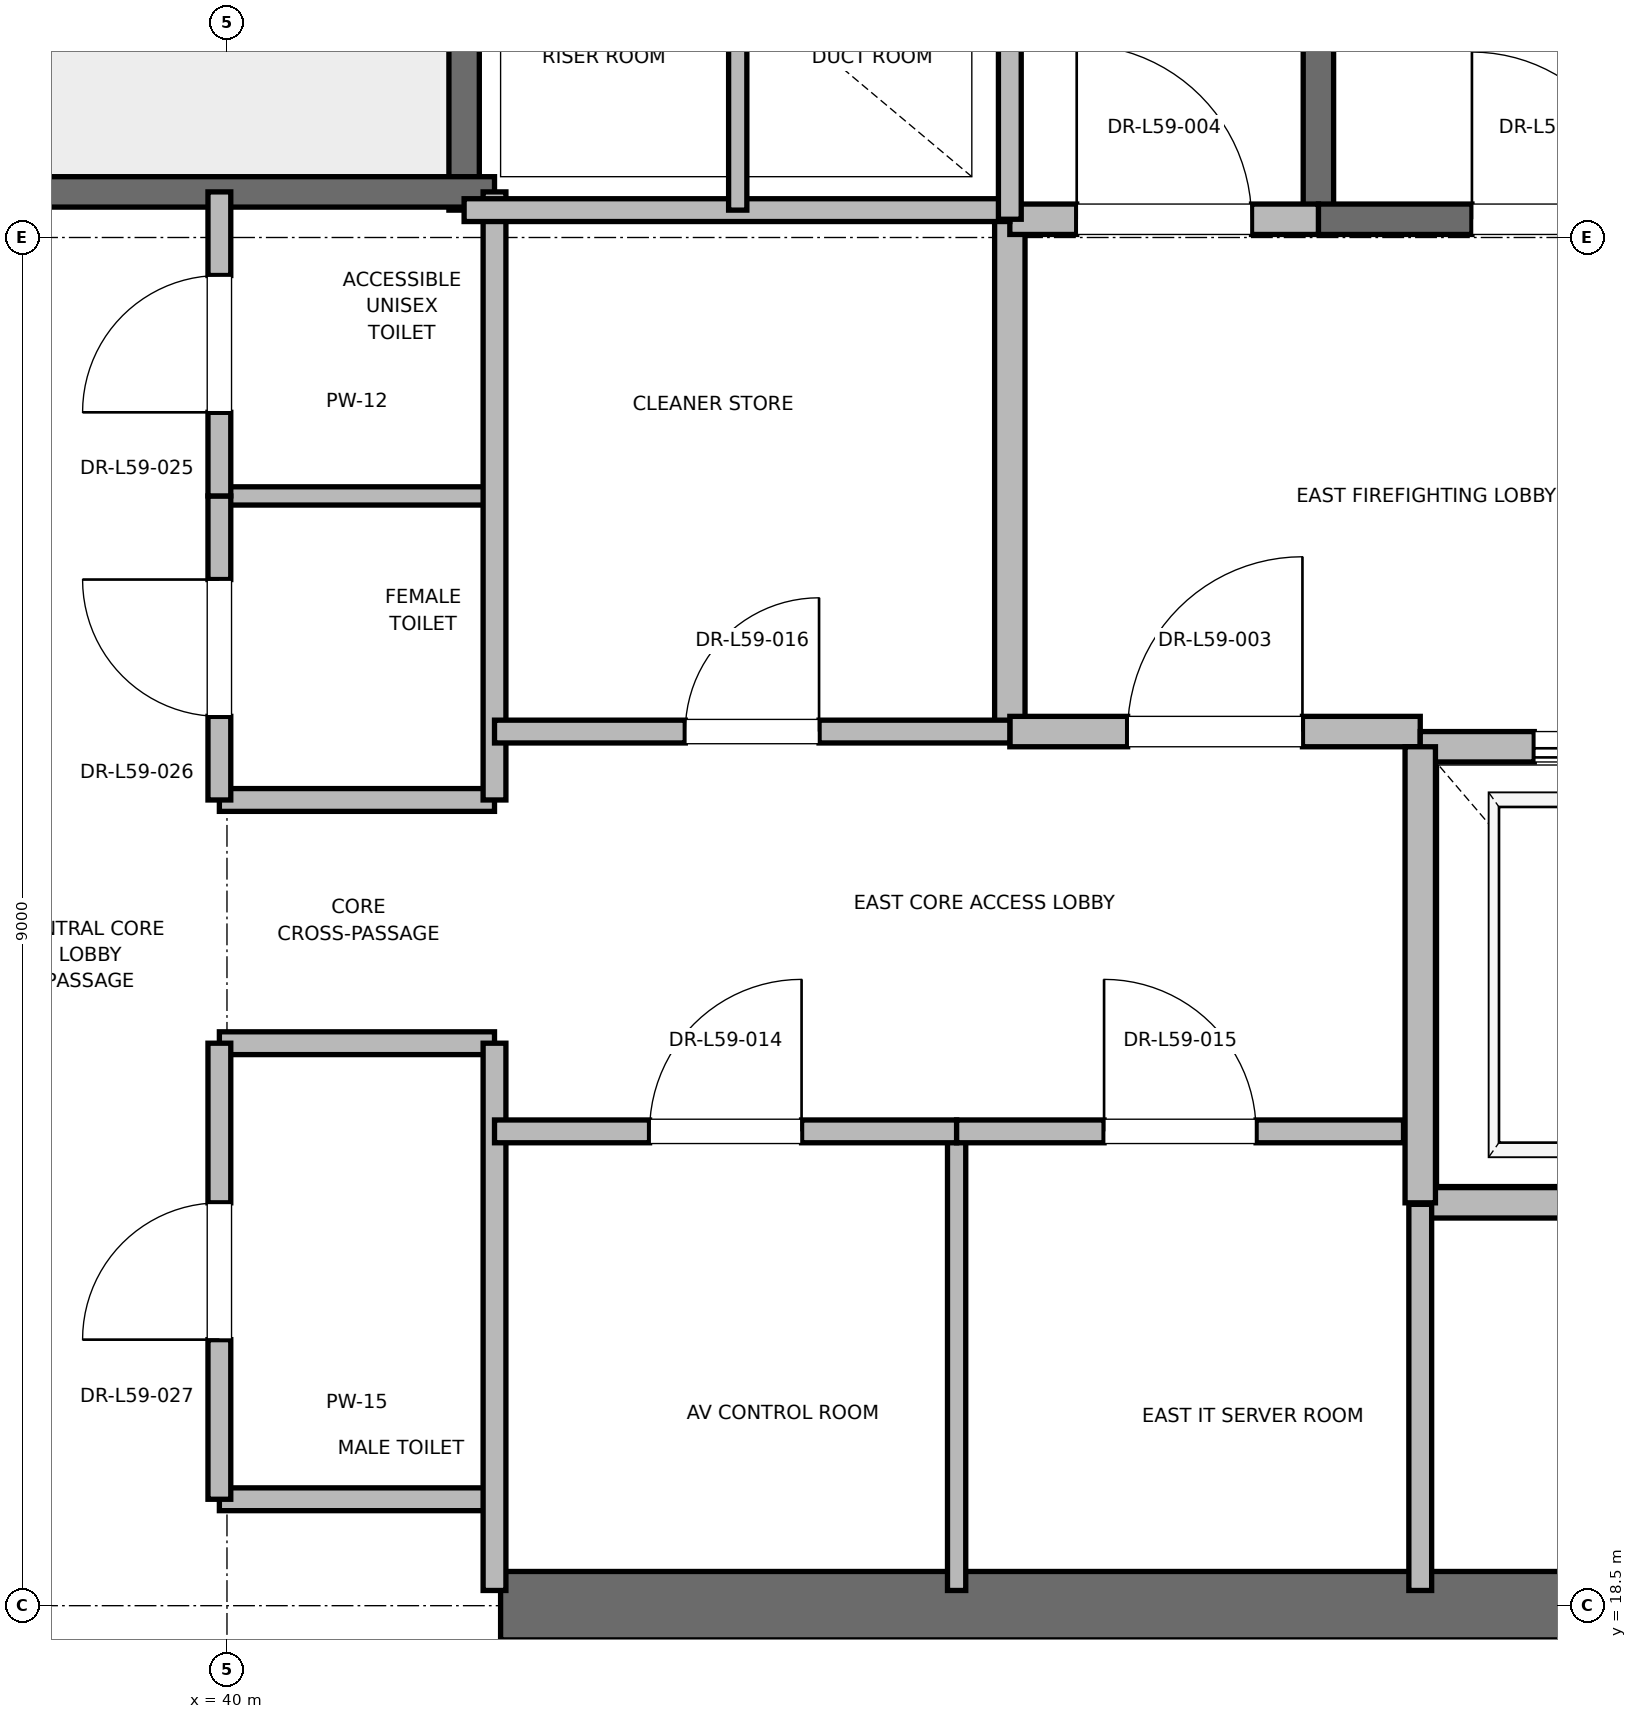
"""IFC4 building model, lengths in metres.
Left out: names, types, materials, properties, quantities, classifications, styles, units other than length and angle.
Written with IfcOpenShell. Run it as: python <this file> out.ifc"""

import sys

from ifc_helpers import new_model, si_unit, direction, frame, frame_2d, origin, place, context, subcontext, project, spatial, rectangle, extrude, element, fill, save


model = new_model("IFC4")
c1 = context("Model", 3, precision=1e-05, world=origin(), true_north=direction((0.0, 1.0)))
c2 = subcontext(c1, "Body", "Model", "MODEL_VIEW")
j1 = project(units=[si_unit("LENGTHUNIT", "METRE"), si_unit("PLANEANGLEUNIT", "RADIAN")], contexts=[c1])
p1 = place(None, origin())
s1 = spatial("IfcSite", under=j1, at=p1, CompositionType="ELEMENT")
p2 = place(p1, origin())
s2 = spatial("IfcBuilding", under=s1, at=p2, CompositionType="ELEMENT")
p3 = place(p2, frame((0.0, 0.0, 255.2)))
s3 = spatial("IfcBuildingStorey", under=s2, at=p3, CompositionType="ELEMENT", Elevation=255.2)
p4 = place(p3, frame((41.8, 18.5, 0.0), z_axis=(0.0, 0.0, 1.0), x_axis=(1.0, 0.0, 0.0)))
e1 = element("IfcWall", 1, at=p4, inside=s3, PredefinedType="SHEAR", context=c2, shape_type="SweptSolid", body=[
    extrude(rectangle(XDim=9.2, YDim=0.45, at=frame_2d((4.6, 0.0))), origin(), (0.0, 0.0, 1.0), 3.785),
])
p5 = place(p3, frame((47.18, 27.62, 0.0), z_axis=(0.0, 0.0, 1.0), x_axis=(0.0, 1.0, 0.0)))
e2 = element("IfcWall", 2, at=p5, inside=s3, PredefinedType="SOLIDWALL", context=c2, shape_type="SweptSolid", body=[
    extrude(rectangle(XDim=8.18, YDim=0.2, at=frame_2d((4.09, 0.0))), origin(), (0.0, 0.0, 1.0), 3.785),
])
p6 = place(p3, frame((47.18, 27.62, 0.0), z_axis=(0.0, 0.0, 1.0), x_axis=(1.0, 0.0, 0.0)))
e3 = element("IfcWall", 3, at=p6, inside=s3, PredefinedType="SOLIDWALL", context=c2, shape_type="SweptSolid", body=[
    extrude(rectangle(XDim=3.12, YDim=0.2, at=frame_2d((1.56, 0.0))), origin(), (0.0, 0.0, 1.0), 3.785),
])
p7 = place(p6, frame((1.01, 0.0, 0.0)))
e4 = element("IfcOpeningElement", 4, at=p7, cuts=e3, PredefinedType="OPENING", context=c2, shape_type="SweptSolid", body=[
    extrude(rectangle(XDim=1.1, YDim=2.15, at=frame_2d((0.55, 1.075))), frame((0.0, 0.1, 0.0), z_axis=(0.0, -1.0, 0.0), x_axis=(1.0, 0.0, 0.0)), (0.0, 0.0, 1.0), 0.2),
])
p8 = place(p3, frame((41.56, 27.68, 0.0), z_axis=(0.0, 0.0, 1.0), x_axis=(0.0, 1.0, 0.0)))
e5 = element("IfcWall", 5, at=p8, inside=s3, PredefinedType="SOLIDWALL", context=c2, shape_type="SweptSolid", body=[
    extrude(rectangle(XDim=8.57, YDim=0.2, at=frame_2d((4.285, 0.0))), origin(), (0.0, 0.0, 1.0), 3.785),
])
p9 = place(p3, frame((38.44, 27.8, 0.0), z_axis=(0.0, 0.0, 1.0), x_axis=(1.0, 0.0, 0.0)))
e6 = element("IfcWall", 6, at=p9, inside=s3, PredefinedType="SOLIDWALL", context=c2, shape_type="SweptSolid", body=[
    extrude(rectangle(XDim=3.32, YDim=0.2, at=frame_2d((1.66, 0.0))), origin(), (0.0, 0.0, 1.0), 3.785),
])
p10 = place(p3, frame((45.15, 24.25, 0.0), z_axis=(0.0, 0.0, 1.0), x_axis=(0.0, 1.0, 0.0)))
e7 = element("IfcWall", 7, at=p10, inside=s3, PredefinedType="PARTITIONING", context=c2, shape_type="SweptSolid", body=[
    extrude(rectangle(XDim=3.37, YDim=0.2, at=frame_2d((1.685, 0.0))), origin(), (0.0, 0.0, 1.0), 3.785),
])
p11 = place(p3, frame((45.15, 24.25, 0.0), z_axis=(0.0, 0.0, 1.0), x_axis=(1.0, 0.0, 0.0)))
e8 = element("IfcWall", 8, at=p11, inside=s3, PredefinedType="PARTITIONING", context=c2, shape_type="SweptSolid", body=[
    extrude(rectangle(XDim=2.7, YDim=0.2, at=frame_2d((1.35, 0.0))), origin(), (0.0, 0.0, 1.0), 3.785),
])
p12 = place(p11, frame((0.775, 0.0, 0.0)))
e9 = element("IfcOpeningElement", 9, at=p12, cuts=e8, PredefinedType="OPENING", context=c2, shape_type="SweptSolid", body=[
    extrude(rectangle(XDim=1.15, YDim=2.2, at=frame_2d((0.575, 1.1))), frame((0.0, 0.1, 0.0), z_axis=(0.0, -1.0, 0.0), x_axis=(1.0, 0.0, 0.0)), (0.0, 0.0, 1.0), 0.2),
])
p13 = place(p3, frame((45.15, 27.62, 0.0), z_axis=(0.0, 0.0, 1.0), x_axis=(1.0, 0.0, 0.0)))
e10 = element("IfcWall", 10, at=p13, inside=s3, PredefinedType="PARTITIONING", context=c2, shape_type="SweptSolid", body=[
    extrude(rectangle(XDim=2.03, YDim=0.2, at=frame_2d((1.015, 0.0))), origin(), (0.0, 0.0, 1.0), 3.785),
])
p14 = place(p13, frame((0.44, 0.0, 0.0)))
e11 = element("IfcOpeningElement", 11, at=p14, cuts=e10, PredefinedType="OPENING", context=c2, shape_type="SweptSolid", body=[
    extrude(rectangle(XDim=1.15, YDim=2.2, at=frame_2d((0.575, 1.1))), frame((0.0, 0.1, 0.0), z_axis=(0.0, -1.0, 0.0), x_axis=(1.0, 0.0, 0.0)), (0.0, 0.0, 1.0), 0.2),
])
p15 = place(p3, frame((47.85, 21.15, 0.0), z_axis=(0.0, 0.0, 1.0), x_axis=(1.0, 0.0, 0.0)))
e12 = element("IfcWall", 12, at=p15, inside=s3, PredefinedType="SOLIDWALL", context=c2, shape_type="SweptSolid", body=[
    extrude(rectangle(XDim=2.6, YDim=0.2, at=frame_2d((1.3, 0.0))), origin(), (0.0, 0.0, 1.0), 3.785),
])
p16 = place(p3, frame((50.45, 24.15, 0.0), z_axis=(0.0, 0.0, 1.0), x_axis=(-1.0, 0.0, 0.0)))
e13 = element("IfcWall", 13, at=p16, inside=s3, PredefinedType="SOLIDWALL", context=c2, shape_type="SweptSolid", body=[
    extrude(rectangle(XDim=2.6, YDim=0.2, at=frame_2d((1.3, 0.0))), origin(), (0.0, 0.0, 1.0), 2.865),
])
p17 = place(p16, frame((0.75, 0.0, 0.0)))
e14 = element("IfcOpeningElement", 14, at=p17, cuts=e13, PredefinedType="OPENING", context=c2, shape_type="SweptSolid", body=[
    extrude(rectangle(XDim=1.1, YDim=2.2, at=frame_2d((0.55, 1.1))), frame((0.0, 0.1, 0.0), z_axis=(0.0, -1.0, 0.0), x_axis=(1.0, 0.0, 0.0)), (0.0, 0.0, 1.0), 0.2),
])
p18 = place(p3, frame((47.85, 24.15, 0.0), z_axis=(0.0, 0.0, 1.0), x_axis=(0.0, -1.0, 0.0)))
e15 = element("IfcWall", 15, at=p18, inside=s3, PredefinedType="SOLIDWALL", context=c2, shape_type="SweptSolid", body=[
    extrude(rectangle(XDim=3.0, YDim=0.2, at=frame_2d((1.5, 0.0))), origin(), (0.0, 0.0, 1.0), 3.785),
])
for number, where, z_axis, x_axis in (
    (16, (39.95, 19.2, 0.0), (0.0, 0.0, 1.0), (1.0, 0.0, 0.0)),
    (17, (39.95, 22.2, 0.0), (0.0, 0.0, 1.0), (1.0, 0.0, 0.0)),
    (18, (39.95, 23.8, 0.0), (0.0, 0.0, 1.0), (1.0, 0.0, 0.0)),
):
    element("IfcWall", number, at=place(p3, frame(where, z_axis=z_axis, x_axis=x_axis)), inside=s3, PredefinedType="PARTITIONING", context=c2, shape_type="SweptSolid", body=[
        extrude(rectangle(XDim=1.81, YDim=0.15, at=frame_2d((0.905, 0.0))), origin(), (0.0, 0.0, 1.0), 2.85),
    ])
p19 = place(p3, frame((39.95, 25.8, 0.0), z_axis=(0.0, 0.0, 1.0), x_axis=(1.0, 0.0, 0.0)))
e19 = element("IfcWall", 19, at=p19, inside=s3, PredefinedType="PARTITIONING", context=c2, shape_type="SweptSolid", body=[
    extrude(rectangle(XDim=1.81, YDim=0.12, at=frame_2d((0.905, 0.0))), origin(), (0.0, 0.0, 1.0), 2.85),
])
p20 = place(p3, frame((41.76, 18.6, 0.0), z_axis=(0.0, 0.0, 1.0), x_axis=(0.0, 1.0, 0.0)))
e20 = element("IfcWall", 20, at=p20, inside=s3, PredefinedType="PARTITIONING", context=c2, shape_type="SweptSolid", body=[
    extrude(rectangle(XDim=3.6, YDim=0.15, at=frame_2d((1.8, 0.0))), origin(), (0.0, 0.0, 1.0), 2.85),
])
p21 = place(p3, frame((41.76, 23.8, 0.0), z_axis=(0.0, 0.0, 1.0), x_axis=(0.0, 1.0, 0.0)))
e21 = element("IfcWall", 21, at=p21, inside=s3, PredefinedType="PARTITIONING", context=c2, shape_type="SweptSolid", body=[
    extrude(rectangle(XDim=4.0, YDim=0.15, at=frame_2d((2.0, 0.0))), origin(), (0.0, 0.0, 1.0), 2.85),
])
p22 = place(p3, frame((39.95, 19.2, 0.0), z_axis=(0.0, 0.0, 1.0), x_axis=(0.0, 1.0, 0.0)))
e22 = element("IfcWall", 22, at=p22, inside=s3, PredefinedType="PARTITIONING", context=c2, shape_type="SweptSolid", body=[
    extrude(rectangle(XDim=3.0, YDim=0.15, at=frame_2d((1.5, 0.0))), origin(), (0.0, 0.0, 1.0), 2.85),
])
p23 = place(p22, frame((1.05, 0.0, 0.0)))
e23 = element("IfcOpeningElement", 23, at=p23, cuts=e22, PredefinedType="OPENING", context=c2, shape_type="SweptSolid", body=[
    extrude(rectangle(XDim=0.9, YDim=2.1, at=frame_2d((0.45, 1.05))), frame((0.0, 0.075, 0.0), z_axis=(0.0, -1.0, 0.0), x_axis=(1.0, 0.0, 0.0)), (0.0, 0.0, 1.0), 0.15),
])
p24 = place(p3, frame((39.95, 23.8, 0.0), z_axis=(0.0, 0.0, 1.0), x_axis=(0.0, 1.0, 0.0)))
e24 = element("IfcWall", 24, at=p24, inside=s3, PredefinedType="PARTITIONING", context=c2, shape_type="SweptSolid", body=[
    extrude(rectangle(XDim=2.0, YDim=0.15, at=frame_2d((1.0, 0.0))), origin(), (0.0, 0.0, 1.0), 2.85),
])
p25 = place(p24, frame((0.55, 0.0, 0.0)))
e25 = element("IfcOpeningElement", 25, at=p25, cuts=e24, PredefinedType="OPENING", context=c2, shape_type="SweptSolid", body=[
    extrude(rectangle(XDim=0.9, YDim=2.1, at=frame_2d((0.45, 1.05))), frame((0.0, 0.075, 0.0), z_axis=(0.0, -1.0, 0.0), x_axis=(1.0, 0.0, 0.0)), (0.0, 0.0, 1.0), 0.15),
])
p26 = place(p3, frame((39.95, 25.8, 0.0), z_axis=(0.0, 0.0, 1.0), x_axis=(0.0, 1.0, 0.0)))
e26 = element("IfcWall", 26, at=p26, inside=s3, PredefinedType="PARTITIONING", context=c2, shape_type="SweptSolid", body=[
    extrude(rectangle(XDim=2.0, YDim=0.15, at=frame_2d((1.0, 0.0))), origin(), (0.0, 0.0, 1.0), 2.85),
])
p27 = place(p26, frame((0.55, 0.0, 0.0)))
e27 = element("IfcOpeningElement", 27, at=p27, cuts=e26, PredefinedType="OPENING", context=c2, shape_type="SweptSolid", body=[
    extrude(rectangle(XDim=0.9, YDim=2.1, at=frame_2d((0.45, 1.05))), frame((0.0, 0.075, 0.0), z_axis=(0.0, -1.0, 0.0), x_axis=(1.0, 0.0, 0.0)), (0.0, 0.0, 1.0), 0.15),
])
p28 = place(p3, frame((41.56, 27.68, 0.0), z_axis=(0.0, 0.0, 1.0), x_axis=(1.0, 0.0, 0.0)))
e28 = element("IfcWall", 28, at=p28, inside=s3, PredefinedType="PARTITIONING", context=c2, shape_type="SweptSolid", body=[
    extrude(rectangle(XDim=3.59, YDim=0.15, at=frame_2d((1.795, 0.0))), origin(), (0.0, 0.0, 1.0), 2.85),
])
p29 = place(p3, frame((47.85, 18.6, 0.0), z_axis=(0.0, 0.0, 1.0), x_axis=(0.0, 1.0, 0.0)))
e29 = element("IfcWall", 29, at=p29, inside=s3, PredefinedType="PARTITIONING", context=c2, shape_type="SweptSolid", body=[
    extrude(rectangle(XDim=2.54, YDim=0.15, at=frame_2d((1.27, 0.0))), origin(), (0.0, 0.0, 1.0), 2.85),
])
p30 = place(p3, frame((44.8, 18.6, 0.0), z_axis=(0.0, 0.0, 1.0), x_axis=(0.0, 1.0, 0.0)))
e30 = element("IfcWall", 30, at=p30, inside=s3, PredefinedType="PARTITIONING", context=c2, shape_type="SweptSolid", body=[
    extrude(rectangle(XDim=3.02, YDim=0.12, at=frame_2d((1.51, 0.0))), origin(), (0.0, 0.0, 1.0), 2.85),
])
p31 = place(p3, frame((41.76, 21.62, 0.0), z_axis=(0.0, 0.0, 1.0), x_axis=(1.0, 0.0, 0.0)))
e31 = element("IfcWall", 31, at=p31, inside=s3, PredefinedType="PARTITIONING", context=c2, shape_type="SweptSolid", body=[
    extrude(rectangle(XDim=3.04, YDim=0.15, at=frame_2d((1.52, 0.0))), origin(), (0.0, 0.0, 1.0), 2.85),
])
p32 = place(p31, frame((1.02, 0.0, 0.0)))
e32 = element("IfcOpeningElement", 32, at=p32, cuts=e31, PredefinedType="OPENING", context=c2, shape_type="SweptSolid", body=[
    extrude(rectangle(XDim=1.0, YDim=2.15, at=frame_2d((0.5, 1.075))), frame((0.0, 0.075, 0.0), z_axis=(0.0, -1.0, 0.0), x_axis=(1.0, 0.0, 0.0)), (0.0, 0.0, 1.0), 0.15),
])
p33 = place(p3, frame((44.8, 21.62, 0.0), z_axis=(0.0, 0.0, 1.0), x_axis=(1.0, 0.0, 0.0)))
e33 = element("IfcWall", 33, at=p33, inside=s3, PredefinedType="PARTITIONING", context=c2, shape_type="SweptSolid", body=[
    extrude(rectangle(XDim=2.94, YDim=0.15, at=frame_2d((1.47, 0.0))), origin(), (0.0, 0.0, 1.0), 2.85),
])
p34 = place(p33, frame((0.97, 0.0, 0.0)))
e34 = element("IfcOpeningElement", 34, at=p34, cuts=e33, PredefinedType="OPENING", context=c2, shape_type="SweptSolid", body=[
    extrude(rectangle(XDim=1.0, YDim=2.15, at=frame_2d((0.5, 1.075))), frame((0.0, 0.075, 0.0), z_axis=(0.0, -1.0, 0.0), x_axis=(1.0, 0.0, 0.0)), (0.0, 0.0, 1.0), 0.15),
])
p35 = place(p3, frame((41.76, 24.25, 0.0), z_axis=(0.0, 0.0, 1.0), x_axis=(1.0, 0.0, 0.0)))
e35 = element("IfcWall", 35, at=p35, inside=s3, PredefinedType="PARTITIONING", context=c2, shape_type="SweptSolid", body=[
    extrude(rectangle(XDim=3.39, YDim=0.15, at=frame_2d((1.695, 0.0))), origin(), (0.0, 0.0, 1.0), 2.85),
])
p36 = place(p35, frame((1.255, 0.0, 0.0)))
e36 = element("IfcOpeningElement", 36, at=p36, cuts=e35, PredefinedType="OPENING", context=c2, shape_type="SweptSolid", body=[
    extrude(rectangle(XDim=0.88, YDim=2.1, at=frame_2d((0.44, 1.05))), frame((0.0, 0.075, 0.0), z_axis=(0.0, -1.0, 0.0), x_axis=(1.0, 0.0, 0.0)), (0.0, 0.0, 1.0), 0.15),
])
p37 = place(p3, frame((45.15, 27.62, 0.0), z_axis=(0.0, 0.0, 1.0), x_axis=(0.0, 1.0, 0.0)))
e37 = element("IfcWall", 37, at=p37, inside=s3, PredefinedType="PARTITIONING", context=c2, shape_type="SweptSolid", body=[
    extrude(rectangle(XDim=3.1, YDim=0.15, at=frame_2d((1.55, 0.0))), origin(), (0.0, 0.0, 1.0), 2.85),
])
p38 = place(p3, frame((43.36, 27.68, 0.0), z_axis=(0.0, 0.0, 1.0), x_axis=(0.0, 1.0, 0.0)))
e38 = element("IfcWall", 38, at=p38, inside=s3, PredefinedType="PARTITIONING", context=c2, shape_type="SweptSolid", body=[
    extrude(rectangle(XDim=3.04, YDim=0.12, at=frame_2d((1.52, 0.0))), origin(), (0.0, 0.0, 1.0), 2.85),
])
p39 = place(p7, origin())
e39 = element("IfcDoor", 39, at=p39, inside=s3, OperationType="SINGLE_SWING_LEFT", PredefinedType="DOOR", context=c2, shape_type="SweptSolid", body=[
    extrude(rectangle(XDim=1.1, YDim=2.15, at=frame_2d((0.55, 1.075))), frame((0.0, 0.025, 0.0), z_axis=(0.0, -1.0, 0.0), x_axis=(1.0, 0.0, 0.0)), (0.0, 0.0, 1.0), 0.05),
])
fill(e4, e39)
p40 = place(p12, origin())
e40 = element("IfcDoor", 40, at=p40, inside=s3, OperationType="SINGLE_SWING_RIGHT", PredefinedType="DOOR", context=c2, shape_type="SweptSolid", body=[
    extrude(rectangle(XDim=1.15, YDim=2.2, at=frame_2d((0.575, 1.1))), frame((0.0, 0.025, 0.0), z_axis=(0.0, -1.0, 0.0), x_axis=(1.0, 0.0, 0.0)), (0.0, 0.0, 1.0), 0.05),
])
fill(e9, e40)
p41 = place(p14, origin())
e41 = element("IfcDoor", 41, at=p41, inside=s3, OperationType="SINGLE_SWING_LEFT", PredefinedType="DOOR", context=c2, shape_type="SweptSolid", body=[
    extrude(rectangle(XDim=1.15, YDim=2.2, at=frame_2d((0.575, 1.1))), frame((0.0, 0.025, 0.0), z_axis=(0.0, -1.0, 0.0), x_axis=(1.0, 0.0, 0.0)), (0.0, 0.0, 1.0), 0.05),
])
fill(e11, e41)
p42 = place(p17, origin())
e42 = element("IfcDoor", 42, at=p42, inside=s3, OperationType="SLIDING_TO_RIGHT", PredefinedType="DOOR", context=c2, shape_type="SweptSolid", body=[
    extrude(rectangle(XDim=1.1, YDim=2.2, at=frame_2d((0.55, 1.1))), frame((0.0, 0.025, 0.0), z_axis=(0.0, -1.0, 0.0), x_axis=(1.0, 0.0, 0.0)), (0.0, 0.0, 1.0), 0.05),
])
fill(e14, e42)
p43 = place(p23, origin())
e43 = element("IfcDoor", 43, at=p43, inside=s3, OperationType="SINGLE_SWING_LEFT", PredefinedType="DOOR", context=c2, shape_type="SweptSolid", body=[
    extrude(rectangle(XDim=0.9, YDim=2.1, at=frame_2d((0.45, 1.05))), frame((0.0, 0.025, 0.0), z_axis=(0.0, -1.0, 0.0), x_axis=(1.0, 0.0, 0.0)), (0.0, 0.0, 1.0), 0.05),
])
fill(e23, e43)
p44 = place(p25, origin())
e44 = element("IfcDoor", 44, at=p44, inside=s3, OperationType="SINGLE_SWING_RIGHT", PredefinedType="DOOR", context=c2, shape_type="SweptSolid", body=[
    extrude(rectangle(XDim=0.9, YDim=2.1, at=frame_2d((0.45, 1.05))), frame((0.0, 0.025, 0.0), z_axis=(0.0, -1.0, 0.0), x_axis=(1.0, 0.0, 0.0)), (0.0, 0.0, 1.0), 0.05),
])
fill(e25, e44)
p45 = place(p27, origin())
e45 = element("IfcDoor", 45, at=p45, inside=s3, OperationType="SINGLE_SWING_LEFT", PredefinedType="DOOR", context=c2, shape_type="SweptSolid", body=[
    extrude(rectangle(XDim=0.9, YDim=2.1, at=frame_2d((0.45, 1.05))), frame((0.0, 0.025, 0.0), z_axis=(0.0, -1.0, 0.0), x_axis=(1.0, 0.0, 0.0)), (0.0, 0.0, 1.0), 0.05),
])
fill(e27, e45)
p46 = place(p32, origin())
e46 = element("IfcDoor", 46, at=p46, inside=s3, OperationType="SINGLE_SWING_RIGHT", PredefinedType="DOOR", context=c2, shape_type="SweptSolid", body=[
    extrude(rectangle(XDim=1.0, YDim=2.15, at=frame_2d((0.5, 1.075))), frame((0.0, 0.025, 0.0), z_axis=(0.0, -1.0, 0.0), x_axis=(1.0, 0.0, 0.0)), (0.0, 0.0, 1.0), 0.05),
])
fill(e32, e46)
p47 = place(p34, origin())
e47 = element("IfcDoor", 47, at=p47, inside=s3, OperationType="SINGLE_SWING_LEFT", PredefinedType="DOOR", context=c2, shape_type="SweptSolid", body=[
    extrude(rectangle(XDim=1.0, YDim=2.15, at=frame_2d((0.5, 1.075))), frame((0.0, 0.025, 0.0), z_axis=(0.0, -1.0, 0.0), x_axis=(1.0, 0.0, 0.0)), (0.0, 0.0, 1.0), 0.05),
])
fill(e34, e47)
p48 = place(p36, origin())
e48 = element("IfcDoor", 48, at=p48, inside=s3, OperationType="SINGLE_SWING_RIGHT", PredefinedType="DOOR", context=c2, shape_type="SweptSolid", body=[
    extrude(rectangle(XDim=0.88, YDim=2.1, at=frame_2d((0.44, 1.05))), frame((0.0, 0.025, 0.0), z_axis=(0.0, -1.0, 0.0), x_axis=(1.0, 0.0, 0.0)), (0.0, 0.0, 1.0), 0.05),
])
fill(e36, e48)
save(model, sys.argv[1])
